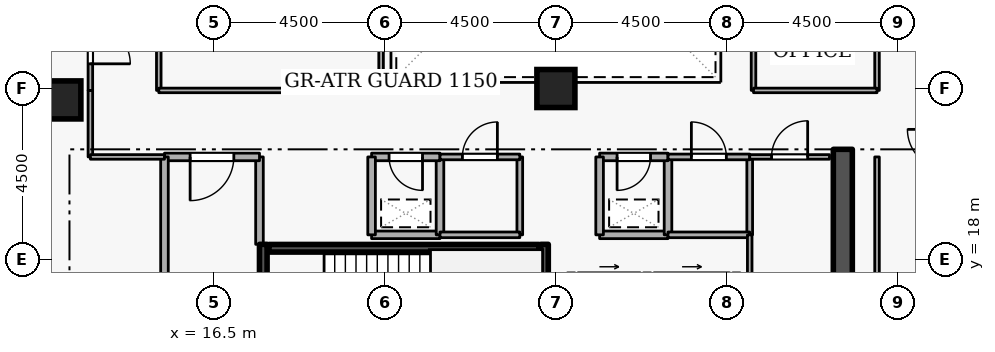
"""IFC4 building model, lengths in metres.
Left out: names, types, materials, properties, quantities, classifications, styles, units other than length and angle.
Written with IfcOpenShell. Run it as: python <this file> out.ifc"""

import sys

from ifc_helpers import new_model, si_unit, direction, frame, frame_2d, origin, origin_2d, place, context, subcontext, project, spatial, rectangle, extrude, element, fill, save


model = new_model("IFC4")
c1 = context("Model", 3, precision=1e-05, world=origin(), true_north=direction((0.0, 1.0)))
c2 = subcontext(c1, "Body", "Model", "MODEL_VIEW")
j1 = project(units=[si_unit("LENGTHUNIT", "METRE"), si_unit("PLANEANGLEUNIT", "RADIAN")], contexts=[c1])
p1 = place(None, origin())
s1 = spatial("IfcSite", under=j1, at=p1, CompositionType="ELEMENT")
p2 = place(p1, origin())
s2 = spatial("IfcBuilding", under=s1, at=p2, CompositionType="ELEMENT")
p3 = place(p2, frame((0.0, 0.0, 229.5)))
s3 = spatial("IfcBuildingStorey", under=s2, at=p3, CompositionType="ELEMENT", Elevation=229.5)
p4 = place(p3, frame((33.05, 15.1, 0.0), z_axis=(0.0, 0.0, 1.0), x_axis=(0.0, 1.0, 0.0)))
e1 = element("IfcWall", 1, at=p4, inside=s3, PredefinedType="SHEAR", context=c2, shape_type="SweptSolid", body=[
    extrude(rectangle(XDim=5.8, YDim=0.5, at=frame_2d((2.9, 0.0))), origin(), (0.0, 0.0, 1.0), 3.6),
])
for number, where, z_axis, x_axis in (
    (2, (12.5, 22.2, 0.0), (0.0, 0.0, 1.0), (1.0, 0.0, 0.0)),
    (3, (25.5, 22.5, 0.0), (0.0, 0.0, 1.0), (1.0, 0.0, 0.0)),
):
    element("IfcColumn", number, at=place(p3, frame(where, z_axis=z_axis, x_axis=x_axis)), inside=s3, PredefinedType="COLUMN", context=c2, shape_type="SweptSolid", body=[
        extrude(rectangle(XDim=1.0, YDim=1.0, at=origin_2d()), origin(), (0.0, 0.0, 1.0), 3.6),
    ])
p5 = place(p3, frame((26.08, 17.55, 0.0), z_axis=(0.0, 0.0, 1.0), x_axis=(1.0, 0.0, 0.0)))
e4 = element("IfcWall", 4, at=p5, inside=s3, PredefinedType="STANDARD", context=c2, shape_type="SweptSolid", body=[
    extrude(rectangle(XDim=1.64, YDim=0.2, at=frame_2d((0.82, 0.0))), origin(), (0.0, 0.0, 1.0), 3.3),
])
p6 = place(p5, frame((0.31, 0.0, 0.0)))
e5 = element("IfcOpeningElement", 5, at=p6, cuts=e4, PredefinedType="OPENING", context=c2, shape_type="SweptSolid", body=[
    extrude(rectangle(XDim=1.02, YDim=2.06, at=frame_2d((0.51, 1.03))), frame((0.0, 0.11, 0.0), z_axis=(0.0, -1.0, 0.0), x_axis=(1.0, 0.0, 0.0)), (0.0, 0.0, 1.0), 0.22),
])
p7 = place(p3, frame((28.08, 17.55, 0.0), z_axis=(0.0, 0.0, 1.0), x_axis=(1.0, 0.0, 0.0)))
e6 = element("IfcWall", 6, at=p7, inside=s3, PredefinedType="STANDARD", context=c2, shape_type="SweptSolid", body=[
    extrude(rectangle(XDim=1.99, YDim=0.2, at=frame_2d((0.995, 0.0))), origin(), (0.0, 0.0, 1.0), 3.3),
])
p8 = place(p7, frame((0.485, 0.0, 0.0)))
e7 = element("IfcOpeningElement", 7, at=p8, cuts=e6, PredefinedType="OPENING", context=c2, shape_type="SweptSolid", body=[
    extrude(rectangle(XDim=1.02, YDim=2.06, at=frame_2d((0.51, 1.03))), frame((0.0, 0.11, 0.0), z_axis=(0.0, -1.0, 0.0), x_axis=(1.0, 0.0, 0.0)), (0.0, 0.0, 1.0), 0.22),
])
p9 = place(p3, frame((17.8, 15.05, 0.0), z_axis=(0.0, 0.0, 1.0), x_axis=(0.0, 1.0, 0.0)))
e8 = element("IfcWall", 8, at=p9, inside=s3, PredefinedType="SHEAR", context=c2, shape_type="SweptSolid", body=[
    extrude(rectangle(XDim=3.35, YDim=0.2, at=frame_2d((1.675, 0.0))), origin(), (0.0, 0.0, 1.0), 3.6),
])
p10 = place(p9, frame((1.125, 0.0, 0.0)))
e9 = element("IfcOpeningElement", 9, at=p10, cuts=e8, PredefinedType="OPENING", context=c2, shape_type="SweptSolid", body=[
    extrude(rectangle(XDim=1.1, YDim=2.1, at=frame_2d((0.55, 1.05))), frame((0.0, 0.11, 0.0), z_axis=(0.0, -1.0, 0.0), x_axis=(1.0, 0.0, 0.0)), (0.0, 0.0, 1.0), 0.22),
])
p11 = place(p3, frame((25.2, 18.4, 0.0), z_axis=(0.0, 0.0, 1.0), x_axis=(0.0, -1.0, 0.0)))
e10 = element("IfcWall", 10, at=p11, inside=s3, PredefinedType="SHEAR", context=c2, shape_type="SweptSolid", body=[
    extrude(rectangle(XDim=3.35, YDim=0.2, at=frame_2d((1.675, 0.0))), origin(), (0.0, 0.0, 1.0), 3.6),
])
p12 = place(p3, frame((25.05, 18.297, 0.0), z_axis=(0.0, 0.0, 1.0), x_axis=(-1.0, 0.0, 0.0)))
e11 = element("IfcWall", 11, at=p12, inside=s3, PredefinedType="SHEAR", context=c2, shape_type="SweptSolid", body=[
    extrude(rectangle(XDim=7.1, YDim=0.2, at=frame_2d((3.55, 0.0))), origin(), (0.0, 0.0, 1.0), 3.6),
])
p13 = place(p3, frame((17.7, 18.4, 0.0), z_axis=(0.0, 0.0, 1.0), x_axis=(0.0, 1.0, 0.0)))
e12 = element("IfcWall", 12, at=p13, inside=s3, PredefinedType="STANDARD", context=c2, shape_type="SweptSolid", body=[
    extrude(rectangle(XDim=2.3, YDim=0.2, at=frame_2d((1.15, 0.0))), origin(), (0.0, 0.0, 1.0), 2.505),
])
p14 = place(p3, frame((17.7, 20.7, 0.0), z_axis=(0.0, 0.0, 1.0), x_axis=(-1.0, 0.0, 0.0)))
e13 = element("IfcWall", 13, at=p14, inside=s3, PredefinedType="STANDARD", context=c2, shape_type="SweptSolid", body=[
    extrude(rectangle(XDim=2.5, YDim=0.2, at=frame_2d((1.25, 0.0))), origin(), (0.0, 0.0, 1.0), 3.3),
])
p15 = place(p14, frame((0.675, 0.0, 0.0)))
e14 = element("IfcOpeningElement", 14, at=p15, cuts=e13, PredefinedType="OPENING", context=c2, shape_type="SweptSolid", body=[
    extrude(rectangle(XDim=1.15, YDim=2.1, at=frame_2d((0.575, 1.05))), frame((0.0, 0.11, 0.0), z_axis=(0.0, -1.0, 0.0), x_axis=(1.0, 0.0, 0.0)), (0.0, 0.0, 1.0), 0.22),
])
p16 = place(p3, frame((15.2, 20.7, 0.0), z_axis=(0.0, 0.0, 1.0), x_axis=(0.0, -1.0, 0.0)))
e15 = element("IfcWall", 15, at=p16, inside=s3, PredefinedType="STANDARD", context=c2, shape_type="SweptSolid", body=[
    extrude(rectangle(XDim=5.7, YDim=0.2, at=frame_2d((2.85, 0.0))), origin(), (0.0, 0.0, 1.0), 3.3),
])
p17 = place(p3, frame((26.65, 18.65, 0.0), z_axis=(0.0, 0.0, 1.0), x_axis=(1.0, 0.0, 0.0)))
e16 = element("IfcWall", 16, at=p17, inside=s3, PredefinedType="STANDARD", context=c2, shape_type="SweptSolid", body=[
    extrude(rectangle(XDim=1.8, YDim=0.2, at=frame_2d((0.9, 0.0))), origin(), (0.0, 0.0, 1.0), 3.3),
])
p18 = place(p3, frame((28.45, 18.65, 0.0), z_axis=(0.0, 0.0, 1.0), x_axis=(0.0, 1.0, 0.0)))
e17 = element("IfcWall", 17, at=p18, inside=s3, PredefinedType="STANDARD", context=c2, shape_type="SweptSolid", body=[
    extrude(rectangle(XDim=2.05, YDim=0.2, at=frame_2d((1.025, 0.0))), origin(), (0.0, 0.0, 1.0), 3.3),
])
p19 = place(p3, frame((28.45, 20.7, 0.0), z_axis=(0.0, 0.0, 1.0), x_axis=(-1.0, 0.0, 0.0)))
e18 = element("IfcWall", 18, at=p19, inside=s3, PredefinedType="STANDARD", context=c2, shape_type="SweptSolid", body=[
    extrude(rectangle(XDim=1.8, YDim=0.2, at=frame_2d((0.9, 0.0))), origin(), (0.0, 0.0, 1.0), 3.3),
])
p20 = place(p19, frame((0.46, 0.0, 0.0)))
e19 = element("IfcOpeningElement", 19, at=p20, cuts=e18, PredefinedType="OPENING", context=c2, shape_type="SweptSolid", body=[
    extrude(rectangle(XDim=0.88, YDim=2.04, at=frame_2d((0.44, 1.02))), frame((0.0, 0.11, 0.0), z_axis=(0.0, -1.0, 0.0), x_axis=(1.0, 0.0, 0.0)), (0.0, 0.0, 1.0), 0.22),
])
p21 = place(p3, frame((26.65, 20.7, 0.0), z_axis=(0.0, 0.0, 1.0), x_axis=(0.0, -1.0, 0.0)))
e20 = element("IfcWall", 20, at=p21, inside=s3, PredefinedType="STANDARD", context=c2, shape_type="SweptSolid", body=[
    extrude(rectangle(XDim=2.05, YDim=0.2, at=frame_2d((1.025, 0.0))), origin(), (0.0, 0.0, 1.0), 3.3),
])
p22 = place(p3, frame((20.65, 18.65, 0.0), z_axis=(0.0, 0.0, 1.0), x_axis=(1.0, 0.0, 0.0)))
e21 = element("IfcWall", 21, at=p22, inside=s3, PredefinedType="STANDARD", context=c2, shape_type="SweptSolid", body=[
    extrude(rectangle(XDim=1.8, YDim=0.2, at=frame_2d((0.9, 0.0))), origin(), (0.0, 0.0, 1.0), 3.3),
])
p23 = place(p3, frame((22.45, 18.65, 0.0), z_axis=(0.0, 0.0, 1.0), x_axis=(0.0, 1.0, 0.0)))
e22 = element("IfcWall", 22, at=p23, inside=s3, PredefinedType="STANDARD", context=c2, shape_type="SweptSolid", body=[
    extrude(rectangle(XDim=2.05, YDim=0.2, at=frame_2d((1.025, 0.0))), origin(), (0.0, 0.0, 1.0), 3.3),
])
p24 = place(p3, frame((22.45, 20.7, 0.0), z_axis=(0.0, 0.0, 1.0), x_axis=(-1.0, 0.0, 0.0)))
e23 = element("IfcWall", 23, at=p24, inside=s3, PredefinedType="STANDARD", context=c2, shape_type="SweptSolid", body=[
    extrude(rectangle(XDim=1.8, YDim=0.2, at=frame_2d((0.9, 0.0))), origin(), (0.0, 0.0, 1.0), 3.3),
])
p25 = place(p24, frame((0.46, 0.0, 0.0)))
e24 = element("IfcOpeningElement", 24, at=p25, cuts=e23, PredefinedType="OPENING", context=c2, shape_type="SweptSolid", body=[
    extrude(rectangle(XDim=0.88, YDim=2.04, at=frame_2d((0.44, 1.02))), frame((0.0, 0.11, 0.0), z_axis=(0.0, -1.0, 0.0), x_axis=(1.0, 0.0, 0.0)), (0.0, 0.0, 1.0), 0.22),
])
p26 = place(p3, frame((20.65, 20.7, 0.0), z_axis=(0.0, 0.0, 1.0), x_axis=(0.0, -1.0, 0.0)))
e25 = element("IfcWall", 25, at=p26, inside=s3, PredefinedType="STANDARD", context=c2, shape_type="SweptSolid", body=[
    extrude(rectangle(XDim=2.05, YDim=0.2, at=frame_2d((1.025, 0.0))), origin(), (0.0, 0.0, 1.0), 3.3),
])
p27 = place(p3, frame((24.55, 20.7, 0.0), z_axis=(0.0, 0.0, 1.0), x_axis=(0.0, -1.0, 0.0)))
e26 = element("IfcWall", 26, at=p27, inside=s3, PredefinedType="PARTITIONING", context=c2, shape_type="SweptSolid", body=[
    extrude(rectangle(XDim=2.05, YDim=0.15, at=frame_2d((1.025, 0.0))), origin(), (0.0, 0.0, 1.0), 3.3),
])
p28 = place(p3, frame((24.55, 18.65, 0.0), z_axis=(0.0, 0.0, 1.0), x_axis=(-1.0, 0.0, 0.0)))
e27 = element("IfcWall", 27, at=p28, inside=s3, PredefinedType="PARTITIONING", context=c2, shape_type="SweptSolid", body=[
    extrude(rectangle(XDim=2.1, YDim=0.15, at=frame_2d((1.05, 0.0))), origin(), (0.0, 0.0, 1.0), 3.3),
])
p29 = place(p3, frame((22.45, 20.7, 0.0), z_axis=(0.0, 0.0, 1.0), x_axis=(1.0, 0.0, 0.0)))
e28 = element("IfcWall", 28, at=p29, inside=s3, PredefinedType="PARTITIONING", context=c2, shape_type="SweptSolid", body=[
    extrude(rectangle(XDim=2.1, YDim=0.15, at=frame_2d((1.05, 0.0))), origin(), (0.0, 0.0, 1.0), 3.3),
])
p30 = place(p29, frame((0.59, 0.0, 0.0)))
e29 = element("IfcOpeningElement", 29, at=p30, cuts=e28, PredefinedType="OPENING", context=c2, shape_type="SweptSolid", body=[
    extrude(rectangle(XDim=0.92, YDim=2.08, at=frame_2d((0.46, 1.04))), frame((0.0, 0.085, 0.0), z_axis=(0.0, -1.0, 0.0), x_axis=(1.0, 0.0, 0.0)), (0.0, 0.0, 1.0), 0.17),
])
p31 = place(p3, frame((30.6, 20.7, 0.0), z_axis=(0.0, 0.0, 1.0), x_axis=(0.0, -1.0, 0.0)))
e30 = element("IfcWall", 30, at=p31, inside=s3, PredefinedType="PARTITIONING", context=c2, shape_type="SweptSolid", body=[
    extrude(rectangle(XDim=2.05, YDim=0.15, at=frame_2d((1.025, 0.0))), origin(), (0.0, 0.0, 1.0), 3.3),
])
p32 = place(p3, frame((30.6, 18.65, 0.0), z_axis=(0.0, 0.0, 1.0), x_axis=(-1.0, 0.0, 0.0)))
e31 = element("IfcWall", 31, at=p32, inside=s3, PredefinedType="PARTITIONING", context=c2, shape_type="SweptSolid", body=[
    extrude(rectangle(XDim=2.15, YDim=0.15, at=frame_2d((1.075, 0.0))), origin(), (0.0, 0.0, 1.0), 3.3),
])
p33 = place(p3, frame((28.45, 20.7, 0.0), z_axis=(0.0, 0.0, 1.0), x_axis=(1.0, 0.0, 0.0)))
e32 = element("IfcWall", 32, at=p33, inside=s3, PredefinedType="PARTITIONING", context=c2, shape_type="SweptSolid", body=[
    extrude(rectangle(XDim=2.15, YDim=0.15, at=frame_2d((1.075, 0.0))), origin(), (0.0, 0.0, 1.0), 3.3),
])
p34 = place(p33, frame((0.615, 0.0, 0.0)))
e33 = element("IfcOpeningElement", 33, at=p34, cuts=e32, PredefinedType="OPENING", context=c2, shape_type="SweptSolid", body=[
    extrude(rectangle(XDim=0.92, YDim=2.08, at=frame_2d((0.46, 1.04))), frame((0.0, 0.085, 0.0), z_axis=(0.0, -1.0, 0.0), x_axis=(1.0, 0.0, 0.0)), (0.0, 0.0, 1.0), 0.17),
])
p35 = place(p3, frame((30.6, 15.1, 0.0), z_axis=(0.0, 0.0, 1.0), x_axis=(0.0, 1.0, 0.0)))
e34 = element("IfcWall", 34, at=p35, inside=s3, PredefinedType="PARTITIONING", context=c2, shape_type="SweptSolid", body=[
    extrude(rectangle(XDim=3.55, YDim=0.12, at=frame_2d((1.775, 0.0))), origin(), (0.0, 0.0, 1.0), 3.3),
])
p36 = place(p3, frame((30.6, 20.7, 0.0), z_axis=(0.0, 0.0, 1.0), x_axis=(1.0, 0.0, 0.0)))
e35 = element("IfcWall", 35, at=p36, inside=s3, PredefinedType="PARTITIONING", context=c2, shape_type="SweptSolid", body=[
    extrude(rectangle(XDim=2.1, YDim=0.12, at=frame_2d((1.05, 0.0))), origin(), (0.0, 0.0, 1.0), 3.3),
])
p37 = place(p36, frame((0.575, 0.0, 0.0)))
e36 = element("IfcOpeningElement", 36, at=p37, cuts=e35, PredefinedType="OPENING", context=c2, shape_type="SweptSolid", body=[
    extrude(rectangle(XDim=0.95, YDim=2.1, at=frame_2d((0.475, 1.05))), frame((0.0, 0.07, 0.0), z_axis=(0.0, -1.0, 0.0), x_axis=(1.0, 0.0, 0.0)), (0.0, 0.0, 1.0), 0.14),
])
p38 = place(p3, frame((33.95, 20.7, 0.0), z_axis=(0.0, 0.0, 1.0), x_axis=(0.0, -1.0, 0.0)))
e37 = element("IfcWall", 37, at=p38, inside=s3, PredefinedType="PARTITIONING", context=c2, shape_type="SweptSolid", body=[
    extrude(rectangle(XDim=5.9, YDim=0.12, at=frame_2d((2.95, 0.0))), origin(), (0.0, 0.0, 1.0), 3.3),
])
p39 = place(p3, frame((13.25, 22.45, 0.0), z_axis=(0.0, 0.0, 1.0), x_axis=(0.0, -1.0, 0.0)))
e38 = element("IfcWall", 38, at=p39, inside=s3, PredefinedType="PARTITIONING", context=c2, shape_type="SweptSolid", body=[
    extrude(rectangle(XDim=1.75, YDim=0.12, at=frame_2d((0.875, 0.0))), origin(), (0.0, 0.0, 1.0), 3.3),
])
p40 = place(p3, frame((13.25, 20.7, 0.0), z_axis=(0.0, 0.0, 1.0), x_axis=(1.0, 0.0, 0.0)))
e39 = element("IfcWall", 39, at=p40, inside=s3, PredefinedType="PARTITIONING", context=c2, shape_type="SweptSolid", body=[
    extrude(rectangle(XDim=1.95, YDim=0.12, at=frame_2d((0.975, 0.0))), origin(), (0.0, 0.0, 1.0), 3.3),
])
p41 = place(p3, frame((13.25, 24.9, 0.0), z_axis=(0.0, 0.0, 1.0), x_axis=(0.0, -1.0, 0.0)))
e40 = element("IfcWall", 40, at=p41, inside=s3, PredefinedType="PARTITIONING", context=c2, shape_type="SweptSolid", body=[
    extrude(rectangle(XDim=2.45, YDim=0.12, at=frame_2d((1.225, 0.0))), origin(), (0.0, 0.0, 1.0), 3.3),
])
p42 = place(p41, frame((0.7, 0.0, 0.0)))
e41 = element("IfcOpeningElement", 41, at=p42, cuts=e40, PredefinedType="OPENING", context=c2, shape_type="SweptSolid", body=[
    extrude(rectangle(XDim=1.05, YDim=2.1, at=frame_2d((0.525, 1.05))), frame((0.0, 0.07, 0.0), z_axis=(0.0, -1.0, 0.0), x_axis=(1.0, 0.0, 0.0)), (0.0, 0.0, 1.0), 0.14),
])
p43 = place(p3, frame((15.05, 22.45, 0.0), z_axis=(0.0, 0.0, 1.0), x_axis=(0.0, 1.0, 0.0)))
e42 = element("IfcWall", 42, at=p43, inside=s3, PredefinedType="PARTITIONING", context=c2, shape_type="SweptSolid", body=[
    extrude(rectangle(XDim=9.1, YDim=0.12, at=frame_2d((4.55, 0.0))), origin(), (0.0, 0.0, 1.0), 3.3),
])
p44 = place(p43, frame((4.075, 0.0, 0.0)))
e43 = element("IfcOpeningElement", 43, at=p44, cuts=e42, PredefinedType="OPENING", context=c2, shape_type="SweptSolid", body=[
    extrude(rectangle(XDim=0.95, YDim=2.1, at=frame_2d((0.475, 1.05))), frame((0.0, 0.07, 0.0), z_axis=(0.0, -1.0, 0.0), x_axis=(1.0, 0.0, 0.0)), (0.0, 0.0, 1.0), 0.14),
])
p45 = place(p3, frame((20.9, 31.55, 0.0), z_axis=(0.0, 0.0, 1.0), x_axis=(0.0, -1.0, 0.0)))
e44 = element("IfcWall", 44, at=p45, inside=s3, PredefinedType="PARTITIONING", context=c2, shape_type="SweptSolid", body=[
    extrude(rectangle(XDim=9.1, YDim=0.12, at=frame_2d((4.55, 0.0))), origin(), (0.0, 0.0, 1.0), 3.3),
])
p46 = place(p3, frame((20.9, 22.45, 0.0), z_axis=(0.0, 0.0, 1.0), x_axis=(-1.0, 0.0, 0.0)))
e45 = element("IfcWall", 45, at=p46, inside=s3, PredefinedType="PARTITIONING", context=c2, shape_type="SweptSolid", body=[
    extrude(rectangle(XDim=5.85, YDim=0.12, at=frame_2d((2.925, 0.0))), origin(), (0.0, 0.0, 1.0), 3.3),
])
p47 = place(p3, frame((30.7, 22.45, 0.0), z_axis=(0.0, 0.0, 1.0), x_axis=(0.0, 1.0, 0.0)))
e46 = element("IfcWall", 46, at=p47, inside=s3, PredefinedType="PARTITIONING", context=c2, shape_type="SweptSolid", body=[
    extrude(rectangle(XDim=9.1, YDim=0.12, at=frame_2d((4.55, 0.0))), origin(), (0.0, 0.0, 1.0), 3.3),
])
p48 = place(p3, frame((33.95, 31.55, 0.0), z_axis=(0.0, 0.0, 1.0), x_axis=(0.0, -1.0, 0.0)))
e47 = element("IfcWall", 47, at=p48, inside=s3, PredefinedType="PARTITIONING", context=c2, shape_type="SweptSolid", body=[
    extrude(rectangle(XDim=9.1, YDim=0.12, at=frame_2d((4.55, 0.0))), origin(), (0.0, 0.0, 1.0), 3.3),
])
p49 = place(p48, frame((4.075, 0.0, 0.0)))
e48 = element("IfcOpeningElement", 48, at=p49, cuts=e47, PredefinedType="OPENING", context=c2, shape_type="SweptSolid", body=[
    extrude(rectangle(XDim=0.95, YDim=2.1, at=frame_2d((0.475, 1.05))), frame((0.0, 0.07, 0.0), z_axis=(0.0, -1.0, 0.0), x_axis=(1.0, 0.0, 0.0)), (0.0, 0.0, 1.0), 0.14),
])
p50 = place(p3, frame((33.95, 22.45, 0.0), z_axis=(0.0, 0.0, 1.0), x_axis=(-1.0, 0.0, 0.0)))
e49 = element("IfcWall", 49, at=p50, inside=s3, PredefinedType="PARTITIONING", context=c2, shape_type="SweptSolid", body=[
    extrude(rectangle(XDim=3.25, YDim=0.12, at=frame_2d((1.625, 0.0))), origin(), (0.0, 0.0, 1.0), 3.3),
])
p51 = place(p15, origin())
e50 = element("IfcDoor", 50, at=p51, inside=s3, OperationType="SINGLE_SWING_RIGHT", PredefinedType="DOOR", context=c2, shape_type="SweptSolid", body=[
    extrude(rectangle(XDim=1.15, YDim=2.1, at=frame_2d((0.575, 1.05))), frame((0.0, 0.025, 0.0), z_axis=(0.0, -1.0, 0.0), x_axis=(1.0, 0.0, 0.0)), (0.0, 0.0, 1.0), 0.05),
])
fill(e14, e50)
p52 = place(p20, origin())
e51 = element("IfcDoor", 51, at=p52, inside=s3, OperationType="SINGLE_SWING_RIGHT", PredefinedType="DOOR", context=c2, shape_type="SweptSolid", body=[
    extrude(rectangle(XDim=0.88, YDim=2.04, at=frame_2d((0.44, 1.02))), frame((0.0, 0.025, 0.0), z_axis=(0.0, -1.0, 0.0), x_axis=(1.0, 0.0, 0.0)), (0.0, 0.0, 1.0), 0.05),
])
fill(e19, e51)
p53 = place(p25, origin())
e52 = element("IfcDoor", 52, at=p53, inside=s3, OperationType="SINGLE_SWING_LEFT", PredefinedType="DOOR", context=c2, shape_type="SweptSolid", body=[
    extrude(rectangle(XDim=0.88, YDim=2.04, at=frame_2d((0.44, 1.02))), frame((0.0, 0.025, 0.0), z_axis=(0.0, -1.0, 0.0), x_axis=(1.0, 0.0, 0.0)), (0.0, 0.0, 1.0), 0.05),
])
fill(e24, e52)
p54 = place(p30, origin())
e53 = element("IfcDoor", 53, at=p54, inside=s3, OperationType="SINGLE_SWING_RIGHT", PredefinedType="DOOR", context=c2, shape_type="SweptSolid", body=[
    extrude(rectangle(XDim=0.92, YDim=2.08, at=frame_2d((0.46, 1.04))), frame((0.0, 0.025, 0.0), z_axis=(0.0, -1.0, 0.0), x_axis=(1.0, 0.0, 0.0)), (0.0, 0.0, 1.0), 0.05),
])
fill(e29, e53)
p55 = place(p34, origin())
e54 = element("IfcDoor", 54, at=p55, inside=s3, OperationType="SINGLE_SWING_LEFT", PredefinedType="DOOR", context=c2, shape_type="SweptSolid", body=[
    extrude(rectangle(XDim=0.92, YDim=2.08, at=frame_2d((0.46, 1.04))), frame((0.0, 0.025, 0.0), z_axis=(0.0, -1.0, 0.0), x_axis=(1.0, 0.0, 0.0)), (0.0, 0.0, 1.0), 0.05),
])
fill(e33, e54)
p56 = place(p37, origin())
e55 = element("IfcDoor", 55, at=p56, inside=s3, OperationType="SINGLE_SWING_RIGHT", PredefinedType="DOOR", context=c2, shape_type="SweptSolid", body=[
    extrude(rectangle(XDim=0.95, YDim=2.1, at=frame_2d((0.475, 1.05))), frame((0.0, 0.025, 0.0), z_axis=(0.0, -1.0, 0.0), x_axis=(1.0, 0.0, 0.0)), (0.0, 0.0, 1.0), 0.05),
])
fill(e36, e55)
p57 = place(p42, origin())
e56 = element("IfcDoor", 56, at=p57, inside=s3, OperationType="SINGLE_SWING_RIGHT", PredefinedType="DOOR", context=c2, shape_type="SweptSolid", body=[
    extrude(rectangle(XDim=1.05, YDim=2.1, at=frame_2d((0.525, 1.05))), frame((0.0, 0.025, 0.0), z_axis=(0.0, -1.0, 0.0), x_axis=(1.0, 0.0, 0.0)), (0.0, 0.0, 1.0), 0.05),
])
fill(e41, e56)
save(model, sys.argv[1])
